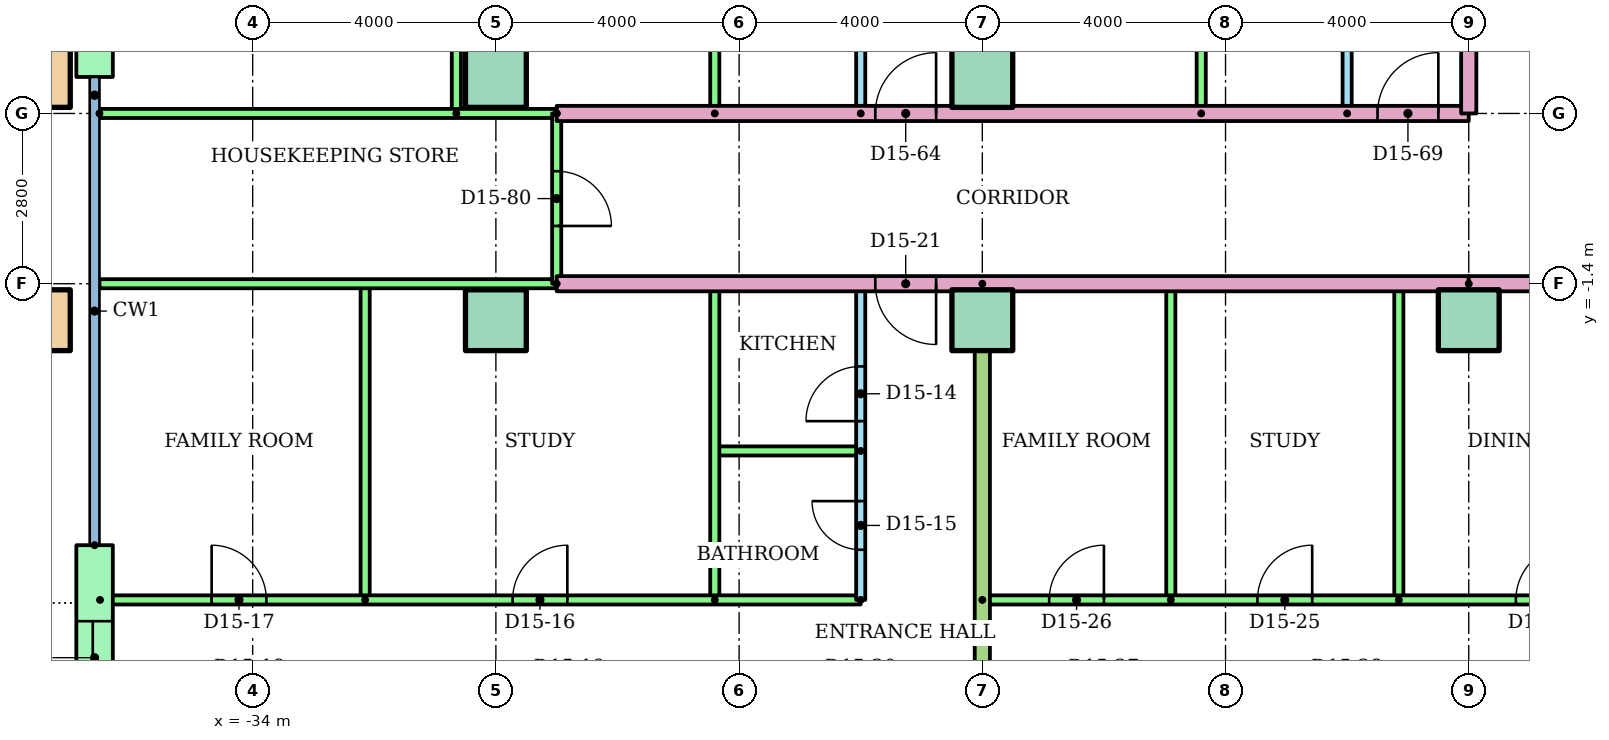
"""IFC4 building model, lengths in metres.
Left out: names, types, materials, properties, quantities, classifications, styles, units other than length and angle.
Written with IfcOpenShell. Run it as: python <this file> out.ifc"""

import sys

from ifc_helpers import new_model, si_unit, direction, frame, frame_2d, origin, origin_2d, place, context, subcontext, project, spatial, rectangle, hollow_rectangle, extrude, element, fill, save


model = new_model("IFC4")
c1 = context("Model", 3, precision=1e-05, world=origin(), true_north=direction((0.0, 1.0)))
c2 = subcontext(c1, "Body", "Model", "MODEL_VIEW")
j1 = project(units=[si_unit("LENGTHUNIT", "METRE"), si_unit("PLANEANGLEUNIT", "RADIAN")], contexts=[c1])
p1 = place(None, origin())
s1 = spatial("IfcSite", under=j1, at=p1, CompositionType="ELEMENT")
p2 = place(p1, origin())
s2 = spatial("IfcBuilding", under=s1, at=p2, CompositionType="ELEMENT")
p3 = place(p2, frame((0.0, 0.0, 57.6)))
s3 = spatial("IfcBuildingStorey", under=s2, at=p3, CompositionType="ELEMENT", Elevation=57.6)
p4 = place(p3, frame((-37.5, -2.0, 0.0)))
e1 = element("IfcColumn", 1, at=p4, inside=s3, PredefinedType="COLUMN", context=c2, shape_type="SweptSolid", body=[
    extrude(hollow_rectangle(XDim=1.0, YDim=1.0, WallThickness=0.05, at=origin_2d()), origin(), (0.0, 0.0, 1.0), 3.2),
])
for number, where in (
    (2, (-30.0, -2.0, 0.0)),
    (3, (-22.0, -2.0, 0.0)),
    (4, (-14.0, -2.0, 0.0)),
):
    element("IfcColumn", number, at=place(p3, frame(where)), inside=s3, PredefinedType="COLUMN", context=c2, shape_type="SweptSolid", body=[
        extrude(rectangle(XDim=1.0, YDim=1.0, at=origin_2d()), origin(), (0.0, 0.0, 1.0), 3.2),
    ])
p5 = place(p3, frame((-37.5, 2.0, 0.0)))
e5 = element("IfcColumn", 5, at=p5, inside=s3, PredefinedType="COLUMN", context=c2, shape_type="SweptSolid", body=[
    extrude(hollow_rectangle(XDim=1.0, YDim=1.0, WallThickness=0.05, at=origin_2d()), origin(), (0.0, 0.0, 1.0), 3.2),
])
for number, where in (
    (6, (-30.0, 2.0, 0.0)),
    (7, (-22.0, 2.0, 0.0)),
):
    element("IfcColumn", number, at=place(p3, frame(where)), inside=s3, PredefinedType="COLUMN", context=c2, shape_type="SweptSolid", body=[
        extrude(rectangle(XDim=1.0, YDim=1.0, at=origin_2d()), origin(), (0.0, 0.0, 1.0), 3.2),
    ])
p6 = place(p3, frame((-36.6, 6.5, 0.0), z_axis=(0.0, 0.0, 1.0), x_axis=(0.0, -1.0, 0.0)))
e8 = element("IfcWall", 8, at=p6, inside=s3, PredefinedType="STANDARD", context=c2, shape_type="SweptSolid", body=[
    extrude(rectangle(XDim=4.5, YDim=0.6, at=frame_2d((2.25, 0.0))), origin(), (0.0, 0.0, 1.0), 2.92),
])
p7 = place(p6, frame((1.65, 0.0, 0.0)))
e9 = element("IfcOpeningElement", 9, at=p7, cuts=e8, PredefinedType="OPENING", context=c2, shape_type="SweptSolid", body=[
    extrude(rectangle(XDim=1.2, YDim=2.1, at=frame_2d((0.6, 1.05))), frame((0.0, 0.31, 0.0), z_axis=(0.0, -1.0, 0.0), x_axis=(1.0, 0.0, 0.0)), (0.0, 0.0, 1.0), 0.62),
])
p8 = place(p3, frame((-36.6, -5.7, 0.0), z_axis=(0.0, 0.0, 1.0), x_axis=(0.0, -1.0, 0.0)))
e10 = element("IfcWall", 10, at=p8, inside=s3, PredefinedType="STANDARD", context=c2, shape_type="SweptSolid", body=[
    extrude(rectangle(XDim=3.7, YDim=0.6, at=frame_2d((1.85, 0.0))), origin(), (0.0, 0.0, 1.0), 2.92),
])
p9 = place(p8, frame((1.25, 0.0, 0.0)))
e11 = element("IfcOpeningElement", 11, at=p9, cuts=e10, PredefinedType="OPENING", context=c2, shape_type="SweptSolid", body=[
    extrude(rectangle(XDim=1.2, YDim=2.1, at=frame_2d((0.6, 1.05))), frame((0.0, 0.31, 0.0), z_axis=(0.0, -1.0, 0.0), x_axis=(1.0, 0.0, 0.0)), (0.0, 0.0, 1.0), 0.62),
])
p10 = place(p3, frame((-24.0, -6.6, 0.0), z_axis=(0.0, 0.0, 1.0), x_axis=(0.0, 1.0, 0.0)))
e12 = element("IfcWall", 12, at=p10, inside=s3, PredefinedType="PARTITIONING", context=c2, shape_type="SweptSolid", body=[
    extrude(rectangle(XDim=5.2, YDim=0.15, at=frame_2d((2.6, 0.0))), origin(), (0.0, 0.0, 1.0), 2.4),
])
p11 = place(p10, frame((2.94, 0.0, 0.0)))
e13 = element("IfcOpeningElement", 13, at=p11, cuts=e12, PredefinedType="OPENING", context=c2, shape_type="SweptSolid", body=[
    extrude(rectangle(XDim=0.9, YDim=2.1, at=frame_2d((0.45, 1.05))), frame((0.0, 0.085, 0.0), z_axis=(0.0, -1.0, 0.0), x_axis=(1.0, 0.0, 0.0)), (0.0, 0.0, 1.0), 0.17),
])
p12 = place(p10, frame((0.825, 0.0, 0.0)))
e14 = element("IfcOpeningElement", 14, at=p12, cuts=e12, PredefinedType="OPENING", context=c2, shape_type="SweptSolid", body=[
    extrude(rectangle(XDim=0.8, YDim=2.1, at=frame_2d((0.4, 1.05))), frame((0.0, 0.085, 0.0), z_axis=(0.0, -1.0, 0.0), x_axis=(1.0, 0.0, 0.0)), (0.0, 0.0, 1.0), 0.17),
])
p13 = place(p3, frame((-24.0, -4.15, 0.0), z_axis=(0.0, 0.0, 1.0), x_axis=(-1.0, 0.0, 0.0)))
e15 = element("IfcWall", 15, at=p13, inside=s3, PredefinedType="PARTITIONING", context=c2, shape_type="SweptSolid", body=[
    extrude(rectangle(XDim=2.4, YDim=0.15, at=frame_2d((1.2, 0.0))), origin(), (0.0, 0.0, 1.0), 2.4),
])
for number, where, z_axis, x_axis in (
    (16, (-26.4, -6.6, 0.0), (0.0, 0.0, 1.0), (0.0, 1.0, 0.0)),
    (17, (-32.15, -6.6, 0.0), (0.0, 0.0, 1.0), (0.0, 1.0, 0.0)),
):
    element("IfcWall", number, at=place(p3, frame(where, z_axis=z_axis, x_axis=x_axis)), inside=s3, PredefinedType="PARTITIONING", context=c2, shape_type="SweptSolid", body=[
        extrude(rectangle(XDim=5.2, YDim=0.15, at=frame_2d((2.6, 0.0))), origin(), (0.0, 0.0, 1.0), 2.4),
    ])
p14 = place(p3, frame((-36.51, -6.6, 0.0)))
e18 = element("IfcWall", 18, at=p14, inside=s3, PredefinedType="PARTITIONING", context=c2, shape_type="SweptSolid", body=[
    extrude(rectangle(XDim=12.51, YDim=0.15, at=frame_2d((6.255, 0.0))), origin(), (0.0, 0.0, 1.0), 2.4),
])
p15 = place(p14, frame((6.785, 0.0, 0.0)))
e19 = element("IfcOpeningElement", 19, at=p15, cuts=e18, PredefinedType="OPENING", context=c2, shape_type="SweptSolid", body=[
    extrude(rectangle(XDim=0.9, YDim=2.1, at=frame_2d((0.45, 1.05))), frame((0.0, 0.085, 0.0), z_axis=(0.0, -1.0, 0.0), x_axis=(1.0, 0.0, 0.0)), (0.0, 0.0, 1.0), 0.17),
])
p16 = place(p14, frame((1.835, 0.0, 0.0)))
e20 = element("IfcOpeningElement", 20, at=p16, cuts=e18, PredefinedType="OPENING", context=c2, shape_type="SweptSolid", body=[
    extrude(rectangle(XDim=0.9, YDim=2.1, at=frame_2d((0.45, 1.05))), frame((0.0, 0.085, 0.0), z_axis=(0.0, -1.0, 0.0), x_axis=(1.0, 0.0, 0.0)), (0.0, 0.0, 1.0), 0.17),
])
for number, where, z_axis, x_axis in (
    (21, (-15.15, -6.6, 0.0), (0.0, 0.0, 1.0), (0.0, 1.0, 0.0)),
    (22, (-18.9, -6.6, 0.0), (0.0, 0.0, 1.0), (0.0, 1.0, 0.0)),
):
    element("IfcWall", number, at=place(p3, frame(where, z_axis=z_axis, x_axis=x_axis)), inside=s3, PredefinedType="PARTITIONING", context=c2, shape_type="SweptSolid", body=[
        extrude(rectangle(XDim=5.2, YDim=0.15, at=frame_2d((2.6, 0.0))), origin(), (0.0, 0.0, 1.0), 2.4),
    ])
p17 = place(p3, frame((-22.0, -6.6, 0.0)))
e23 = element("IfcWall", 23, at=p17, inside=s3, PredefinedType="PARTITIONING", context=c2, shape_type="SweptSolid", body=[
    extrude(rectangle(XDim=14.0, YDim=0.15, at=frame_2d((7.0, 0.0))), origin(), (0.0, 0.0, 1.0), 2.4),
])
p18 = place(p17, frame((8.775, 0.0, 0.0)))
e24 = element("IfcOpeningElement", 24, at=p18, cuts=e23, PredefinedType="OPENING", context=c2, shape_type="SweptSolid", body=[
    extrude(rectangle(XDim=0.9, YDim=2.1, at=frame_2d((0.45, 1.05))), frame((0.0, 0.085, 0.0), z_axis=(0.0, -1.0, 0.0), x_axis=(1.0, 0.0, 0.0)), (0.0, 0.0, 1.0), 0.17),
])
p19 = place(p17, frame((4.525, 0.0, 0.0)))
e25 = element("IfcOpeningElement", 25, at=p19, cuts=e23, PredefinedType="OPENING", context=c2, shape_type="SweptSolid", body=[
    extrude(rectangle(XDim=0.9, YDim=2.1, at=frame_2d((0.45, 1.05))), frame((0.0, 0.085, 0.0), z_axis=(0.0, -1.0, 0.0), x_axis=(1.0, 0.0, 0.0)), (0.0, 0.0, 1.0), 0.17),
])
p20 = place(p17, frame((1.1, 0.0, 0.0)))
e26 = element("IfcOpeningElement", 26, at=p20, cuts=e23, PredefinedType="OPENING", context=c2, shape_type="SweptSolid", body=[
    extrude(rectangle(XDim=0.9, YDim=2.1, at=frame_2d((0.45, 1.05))), frame((0.0, 0.085, 0.0), z_axis=(0.0, -1.0, 0.0), x_axis=(1.0, 0.0, 0.0)), (0.0, 0.0, 1.0), 0.17),
])
p21 = place(p3, frame((-22.0, -1.4, 0.0), z_axis=(0.0, 0.0, 1.0), x_axis=(0.0, -1.0, 0.0)))
e27 = element("IfcWall", 27, at=p21, inside=s3, PredefinedType="PARTITIONING", context=c2, shape_type="SweptSolid", body=[
    extrude(rectangle(XDim=14.71, YDim=0.25, at=frame_2d((7.355, 0.0))), origin(), (0.0, 0.0, 1.0), 2.4),
])
p22 = place(p3, frame((-14.0, -1.4, 0.0), z_axis=(0.0, 0.0, 1.0), x_axis=(-1.0, 0.0, 0.0)))
e28 = element("IfcWall", 28, at=p22, inside=s3, PredefinedType="PARTITIONING", context=c2, shape_type="SweptSolid", body=[
    extrude(rectangle(XDim=15.0, YDim=0.25, at=frame_2d((7.5, 0.0))), origin(), (0.0, 0.0, 1.0), 2.4),
])
p23 = place(p22, frame((8.76, 0.0, 0.0)))
e29 = element("IfcOpeningElement", 29, at=p23, cuts=e28, PredefinedType="OPENING", context=c2, shape_type="SweptSolid", body=[
    extrude(rectangle(XDim=1.0, YDim=2.1, at=frame_2d((0.5, 1.05))), frame((0.0, 0.135, 0.0), z_axis=(0.0, -1.0, 0.0), x_axis=(1.0, 0.0, 0.0)), (0.0, 0.0, 1.0), 0.27),
])
p24 = place(p3, frame((-29.0, -1.4, 0.0), z_axis=(0.0, 0.0, 1.0), x_axis=(-1.0, 0.0, 0.0)))
e30 = element("IfcWall", 30, at=p24, inside=s3, PredefinedType="PARTITIONING", context=c2, shape_type="SweptSolid", body=[
    extrude(rectangle(XDim=7.52, YDim=0.15, at=frame_2d((3.76, 0.0))), origin(), (0.0, 0.0, 1.0), 2.4),
])
p25 = place(p3, frame((-24.0, 1.4, 0.0), z_axis=(0.0, 0.0, 1.0), x_axis=(0.0, 1.0, 0.0)))
e31 = element("IfcWall", 31, at=p25, inside=s3, PredefinedType="PARTITIONING", context=c2, shape_type="SweptSolid", body=[
    extrude(rectangle(XDim=7.6, YDim=0.15, at=frame_2d((3.8, 0.0))), origin(), (0.0, 0.0, 1.0), 2.4),
])
p26 = place(p25, frame((1.675, 0.0, 0.0)))
e32 = element("IfcOpeningElement", 32, at=p26, cuts=e31, PredefinedType="OPENING", context=c2, shape_type="SweptSolid", body=[
    extrude(rectangle(XDim=0.9, YDim=2.1, at=frame_2d((0.45, 1.05))), frame((0.0, 0.085, 0.0), z_axis=(0.0, -1.0, 0.0), x_axis=(1.0, 0.0, 0.0)), (0.0, 0.0, 1.0), 0.17),
])
p27 = place(p25, frame((5.525, 0.0, 0.0)))
e33 = element("IfcOpeningElement", 33, at=p27, cuts=e31, PredefinedType="OPENING", context=c2, shape_type="SweptSolid", body=[
    extrude(rectangle(XDim=0.8, YDim=2.1, at=frame_2d((0.4, 1.05))), frame((0.0, 0.085, 0.0), z_axis=(0.0, -1.0, 0.0), x_axis=(1.0, 0.0, 0.0)), (0.0, 0.0, 1.0), 0.17),
])
for number, where, z_axis, x_axis in (
    (34, (-26.4, 1.4, 0.0), (0.0, 0.0, 1.0), (0.0, 1.0, 0.0)),
    (35, (-30.65, 1.4, 0.0), (0.0, 0.0, 1.0), (0.0, 1.0, 0.0)),
):
    element("IfcWall", number, at=place(p3, frame(where, z_axis=z_axis, x_axis=x_axis)), inside=s3, PredefinedType="PARTITIONING", context=c2, shape_type="SweptSolid", body=[
        extrude(rectangle(XDim=7.6, YDim=0.15, at=frame_2d((3.8, 0.0))), origin(), (0.0, 0.0, 1.0), 2.4),
    ])
p28 = place(p3, frame((-16.0, 1.4, 0.0), z_axis=(0.0, 0.0, 1.0), x_axis=(0.0, 1.0, 0.0)))
e36 = element("IfcWall", 36, at=p28, inside=s3, PredefinedType="PARTITIONING", context=c2, shape_type="SweptSolid", body=[
    extrude(rectangle(XDim=7.6, YDim=0.15, at=frame_2d((3.8, 0.0))), origin(), (0.0, 0.0, 1.0), 2.4),
])
p29 = place(p28, frame((1.675, 0.0, 0.0)))
e37 = element("IfcOpeningElement", 37, at=p29, cuts=e36, PredefinedType="OPENING", context=c2, shape_type="SweptSolid", body=[
    extrude(rectangle(XDim=0.9, YDim=2.1, at=frame_2d((0.45, 1.05))), frame((0.0, 0.085, 0.0), z_axis=(0.0, -1.0, 0.0), x_axis=(1.0, 0.0, 0.0)), (0.0, 0.0, 1.0), 0.17),
])
p30 = place(p28, frame((5.525, 0.0, 0.0)))
e38 = element("IfcOpeningElement", 38, at=p30, cuts=e36, PredefinedType="OPENING", context=c2, shape_type="SweptSolid", body=[
    extrude(rectangle(XDim=0.8, YDim=2.1, at=frame_2d((0.4, 1.05))), frame((0.0, 0.085, 0.0), z_axis=(0.0, -1.0, 0.0), x_axis=(1.0, 0.0, 0.0)), (0.0, 0.0, 1.0), 0.17),
])
p31 = place(p3, frame((-18.4, 1.4, 0.0), z_axis=(0.0, 0.0, 1.0), x_axis=(0.0, 1.0, 0.0)))
e39 = element("IfcWall", 39, at=p31, inside=s3, PredefinedType="PARTITIONING", context=c2, shape_type="SweptSolid", body=[
    extrude(rectangle(XDim=7.6, YDim=0.15, at=frame_2d((3.8, 0.0))), origin(), (0.0, 0.0, 1.0), 2.4),
])
p32 = place(p3, frame((-22.0, 18.521, 0.0), z_axis=(0.0, 0.0, 1.0), x_axis=(0.0, -1.0, 0.0)))
e40 = element("IfcWall", 40, at=p32, inside=s3, PredefinedType="PARTITIONING", context=c2, shape_type="SweptSolid", body=[
    extrude(rectangle(XDim=17.121, YDim=0.25, at=frame_2d((8.561, 0.0))), origin(), (0.0, 0.0, 1.0), 2.4),
])
p33 = place(p3, frame((-29.0, 1.4, 0.0)))
e41 = element("IfcWall", 41, at=p33, inside=s3, PredefinedType="PARTITIONING", context=c2, shape_type="SweptSolid", body=[
    extrude(rectangle(XDim=15.0, YDim=0.25, at=frame_2d((7.5, 0.0))), origin(), (0.0, 0.0, 1.0), 2.4),
])
p34 = place(p33, frame((5.24, 0.0, 0.0)))
e42 = element("IfcOpeningElement", 42, at=p34, cuts=e41, PredefinedType="OPENING", context=c2, shape_type="SweptSolid", body=[
    extrude(rectangle(XDim=1.0, YDim=2.1, at=frame_2d((0.5, 1.05))), frame((0.0, 0.135, 0.0), z_axis=(0.0, -1.0, 0.0), x_axis=(1.0, 0.0, 0.0)), (0.0, 0.0, 1.0), 0.27),
])
p35 = place(p33, frame((13.5, 0.0, 0.0)))
e43 = element("IfcOpeningElement", 43, at=p35, cuts=e41, PredefinedType="OPENING", context=c2, shape_type="SweptSolid", body=[
    extrude(rectangle(XDim=1.0, YDim=2.1, at=frame_2d((0.5, 1.05))), frame((0.0, 0.135, 0.0), z_axis=(0.0, -1.0, 0.0), x_axis=(1.0, 0.0, 0.0)), (0.0, 0.0, 1.0), 0.27),
])
p36 = place(p3, frame((-36.52, 1.4, 0.0)))
e44 = element("IfcWall", 44, at=p36, inside=s3, PredefinedType="PARTITIONING", context=c2, shape_type="SweptSolid", body=[
    extrude(rectangle(XDim=7.52, YDim=0.15, at=frame_2d((3.76, 0.0))), origin(), (0.0, 0.0, 1.0), 2.4),
])
p37 = place(p3, frame((-29.0, 1.4, 0.0), z_axis=(0.0, 0.0, 1.0), x_axis=(0.0, -1.0, 0.0)))
e45 = element("IfcWall", 45, at=p37, inside=s3, PredefinedType="PARTITIONING", context=c2, shape_type="SweptSolid", body=[
    extrude(rectangle(XDim=2.8, YDim=0.15, at=frame_2d((1.4, 0.0))), origin(), (0.0, 0.0, 1.0), 2.4),
])
p38 = place(p37, frame((0.95, 0.0, 0.0)))
e46 = element("IfcOpeningElement", 46, at=p38, cuts=e45, PredefinedType="OPENING", context=c2, shape_type="SweptSolid", body=[
    extrude(rectangle(XDim=0.9, YDim=2.1, at=frame_2d((0.45, 1.05))), frame((0.0, 0.085, 0.0), z_axis=(0.0, -1.0, 0.0), x_axis=(1.0, 0.0, 0.0)), (0.0, 0.0, 1.0), 0.17),
])
p39 = place(p3, frame((14.0, -1.4, 0.0), z_axis=(0.0, 0.0, 1.0), x_axis=(-1.0, 0.0, 0.0)))
e47 = element("IfcWall", 47, at=p39, inside=s3, PredefinedType="PARTITIONING", context=c2, shape_type="SweptSolid", body=[
    extrude(rectangle(XDim=28.0, YDim=0.25, at=frame_2d((14.0, 0.0))), origin(), (0.0, 0.0, 1.0), 2.4),
])
p40 = place(p39, frame((20.76, 0.0, 0.0)))
e48 = element("IfcOpeningElement", 48, at=p40, cuts=e47, PredefinedType="OPENING", context=c2, shape_type="SweptSolid", body=[
    extrude(rectangle(XDim=1.0, YDim=2.1, at=frame_2d((0.5, 1.05))), frame((0.0, 0.135, 0.0), z_axis=(0.0, -1.0, 0.0), x_axis=(1.0, 0.0, 0.0)), (0.0, 0.0, 1.0), 0.27),
])
p41 = place(p39, frame((18.24, 0.0, 0.0)))
e49 = element("IfcOpeningElement", 49, at=p41, cuts=e47, PredefinedType="OPENING", context=c2, shape_type="SweptSolid", body=[
    extrude(rectangle(XDim=1.0, YDim=2.1, at=frame_2d((0.5, 1.05))), frame((0.0, 0.135, 0.0), z_axis=(0.0, -1.0, 0.0), x_axis=(1.0, 0.0, 0.0)), (0.0, 0.0, 1.0), 0.27),
])
p42 = place(p39, frame((2.24, 0.0, 0.0)))
e50 = element("IfcOpeningElement", 50, at=p42, cuts=e47, PredefinedType="OPENING", context=c2, shape_type="SweptSolid", body=[
    extrude(rectangle(XDim=1.0, YDim=2.1, at=frame_2d((0.5, 1.05))), frame((0.0, 0.135, 0.0), z_axis=(0.0, -1.0, 0.0), x_axis=(1.0, 0.0, 0.0)), (0.0, 0.0, 1.0), 0.27),
])
p43 = place(p3, frame((-14.0, 3.0, 0.0), z_axis=(0.0, 0.0, 1.0), x_axis=(0.0, -1.0, 0.0)))
e51 = element("IfcWall", 51, at=p43, inside=s3, PredefinedType="PARTITIONING", context=c2, shape_type="SweptSolid", body=[
    extrude(rectangle(XDim=1.6, YDim=0.25, at=frame_2d((0.8, 0.0))), origin(), (0.0, 0.0, 1.0), 2.4),
])
p44 = place(p11, origin())
e52 = element("IfcDoor", 52, at=p44, inside=s3, OperationType="SINGLE_SWING_LEFT", PredefinedType="DOOR", context=c2, shape_type="SweptSolid", body=[
    extrude(rectangle(XDim=0.9, YDim=2.1, at=frame_2d((0.45, 1.05))), frame((0.0, 0.025, 0.0), z_axis=(0.0, -1.0, 0.0), x_axis=(1.0, 0.0, 0.0)), (0.0, 0.0, 1.0), 0.05),
])
fill(e13, e52)
p45 = place(p12, origin())
e53 = element("IfcDoor", 53, at=p45, inside=s3, OperationType="SINGLE_SWING_RIGHT", PredefinedType="DOOR", context=c2, shape_type="SweptSolid", body=[
    extrude(rectangle(XDim=0.8, YDim=2.1, at=frame_2d((0.4, 1.05))), frame((0.0, 0.025, 0.0), z_axis=(0.0, -1.0, 0.0), x_axis=(1.0, 0.0, 0.0)), (0.0, 0.0, 1.0), 0.05),
])
fill(e14, e53)
p46 = place(p15, origin())
e54 = element("IfcDoor", 54, at=p46, inside=s3, OperationType="SINGLE_SWING_RIGHT", PredefinedType="DOOR", context=c2, shape_type="SweptSolid", body=[
    extrude(rectangle(XDim=0.9, YDim=2.1, at=frame_2d((0.45, 1.05))), frame((0.0, 0.025, 0.0), z_axis=(0.0, -1.0, 0.0), x_axis=(1.0, 0.0, 0.0)), (0.0, 0.0, 1.0), 0.05),
])
fill(e19, e54)
p47 = place(p16, origin())
e55 = element("IfcDoor", 55, at=p47, inside=s3, OperationType="SINGLE_SWING_LEFT", PredefinedType="DOOR", context=c2, shape_type="SweptSolid", body=[
    extrude(rectangle(XDim=0.9, YDim=2.1, at=frame_2d((0.45, 1.05))), frame((0.0, 0.025, 0.0), z_axis=(0.0, -1.0, 0.0), x_axis=(1.0, 0.0, 0.0)), (0.0, 0.0, 1.0), 0.05),
])
fill(e20, e55)
p48 = place(p23, origin())
e56 = element("IfcDoor", 56, at=p48, inside=s3, OperationType="SINGLE_SWING_LEFT", PredefinedType="DOOR", context=c2, shape_type="SweptSolid", body=[
    extrude(rectangle(XDim=1.0, YDim=2.1, at=frame_2d((0.5, 1.05))), frame((0.0, 0.025, 0.0), z_axis=(0.0, -1.0, 0.0), x_axis=(1.0, 0.0, 0.0)), (0.0, 0.0, 1.0), 0.05),
])
fill(e29, e56)
p49 = place(p18, origin())
e57 = element("IfcDoor", 57, at=p49, inside=s3, OperationType="SINGLE_SWING_RIGHT", PredefinedType="DOOR", context=c2, shape_type="SweptSolid", body=[
    extrude(rectangle(XDim=0.9, YDim=2.1, at=frame_2d((0.45, 1.05))), frame((0.0, 0.025, 0.0), z_axis=(0.0, -1.0, 0.0), x_axis=(1.0, 0.0, 0.0)), (0.0, 0.0, 1.0), 0.05),
])
fill(e24, e57)
p50 = place(p19, origin())
e58 = element("IfcDoor", 58, at=p50, inside=s3, OperationType="SINGLE_SWING_RIGHT", PredefinedType="DOOR", context=c2, shape_type="SweptSolid", body=[
    extrude(rectangle(XDim=0.9, YDim=2.1, at=frame_2d((0.45, 1.05))), frame((0.0, 0.025, 0.0), z_axis=(0.0, -1.0, 0.0), x_axis=(1.0, 0.0, 0.0)), (0.0, 0.0, 1.0), 0.05),
])
fill(e25, e58)
p51 = place(p20, origin())
e59 = element("IfcDoor", 59, at=p51, inside=s3, OperationType="SINGLE_SWING_RIGHT", PredefinedType="DOOR", context=c2, shape_type="SweptSolid", body=[
    extrude(rectangle(XDim=0.9, YDim=2.1, at=frame_2d((0.45, 1.05))), frame((0.0, 0.025, 0.0), z_axis=(0.0, -1.0, 0.0), x_axis=(1.0, 0.0, 0.0)), (0.0, 0.0, 1.0), 0.05),
])
fill(e26, e59)
p52 = place(p34, origin())
e60 = element("IfcDoor", 60, at=p52, inside=s3, OperationType="SINGLE_SWING_RIGHT", PredefinedType="DOOR", context=c2, shape_type="SweptSolid", body=[
    extrude(rectangle(XDim=1.0, YDim=2.1, at=frame_2d((0.5, 1.05))), frame((0.0, 0.025, 0.0), z_axis=(0.0, -1.0, 0.0), x_axis=(1.0, 0.0, 0.0)), (0.0, 0.0, 1.0), 0.05),
])
fill(e42, e60)
p53 = place(p35, origin())
e61 = element("IfcDoor", 61, at=p53, inside=s3, OperationType="SINGLE_SWING_RIGHT", PredefinedType="DOOR", context=c2, shape_type="SweptSolid", body=[
    extrude(rectangle(XDim=1.0, YDim=2.1, at=frame_2d((0.5, 1.05))), frame((0.0, 0.025, 0.0), z_axis=(0.0, -1.0, 0.0), x_axis=(1.0, 0.0, 0.0)), (0.0, 0.0, 1.0), 0.05),
])
fill(e43, e61)
p54 = place(p38, origin())
e62 = element("IfcDoor", 62, at=p54, inside=s3, OperationType="SINGLE_SWING_RIGHT", PredefinedType="DOOR", context=c2, shape_type="SweptSolid", body=[
    extrude(rectangle(XDim=0.9, YDim=2.1, at=frame_2d((0.45, 1.05))), frame((0.0, 0.025, 0.0), z_axis=(0.0, -1.0, 0.0), x_axis=(1.0, 0.0, 0.0)), (0.0, 0.0, 1.0), 0.05),
])
fill(e46, e62)
p55 = place(p9, origin())
e63 = element("IfcDoor", 63, at=p55, inside=s3, OperationType="SLIDING_TO_LEFT", PredefinedType="DOOR", context=c2, shape_type="SweptSolid", body=[
    extrude(rectangle(XDim=1.2, YDim=2.1, at=frame_2d((0.6, 1.05))), frame((0.0, 0.025, 0.0), z_axis=(0.0, -1.0, 0.0), x_axis=(1.0, 0.0, 0.0)), (0.0, 0.0, 1.0), 0.05),
])
fill(e11, e63)
save(model, sys.argv[1])
